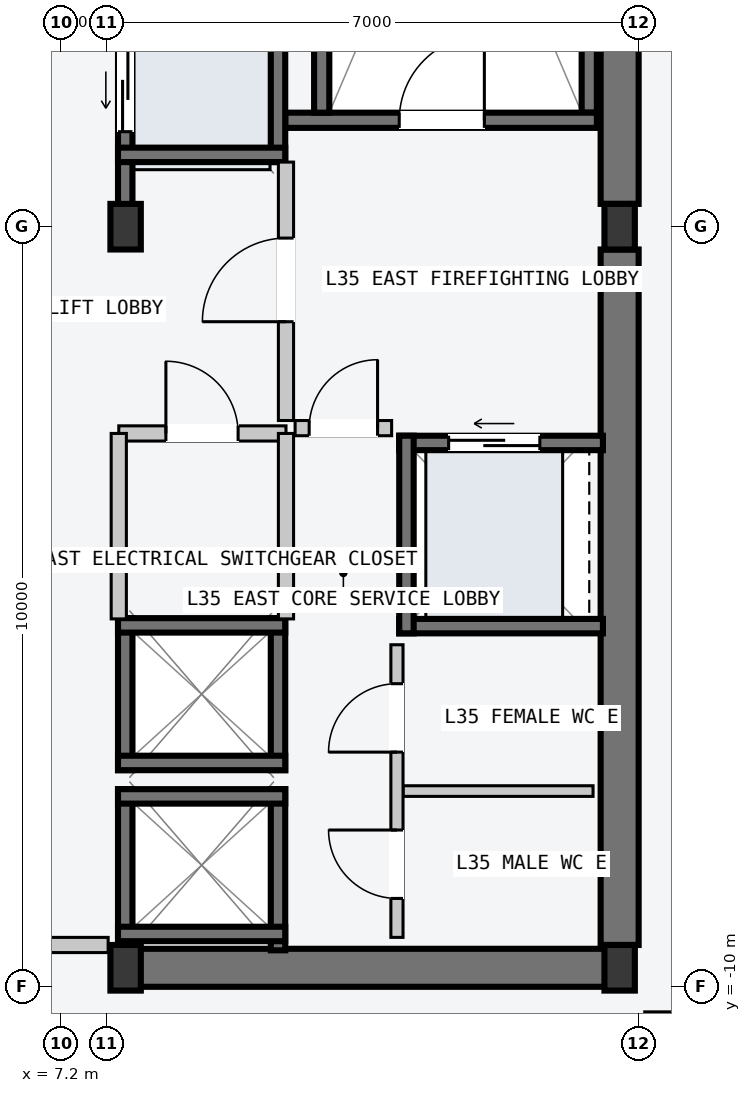
"""IFC4 building model, lengths in metres.
Left out: names, types, materials, properties, quantities, classifications, styles, units other than length and angle.
Written with IfcOpenShell. Run it as: python <this file> out.ifc"""

import sys

from ifc_helpers import new_model, si_unit, direction, frame, frame_2d, origin, origin_2d, place, context, subcontext, project, spatial, rectangle, i_section, extrude, element, fill, save


model = new_model("IFC4")
c1 = context("Model", 3, precision=1e-05, world=origin(), true_north=direction((0.0, 1.0)))
c2 = subcontext(c1, "Body", "Model", "MODEL_VIEW")
j1 = project(units=[si_unit("LENGTHUNIT", "METRE"), si_unit("PLANEANGLEUNIT", "RADIAN")], contexts=[c1])
p1 = place(None, origin())
s1 = spatial("IfcSite", under=j1, at=p1, CompositionType="ELEMENT")
p2 = place(p1, origin())
s2 = spatial("IfcBuilding", under=s1, at=p2, CompositionType="ELEMENT")
p3 = place(p2, frame((0.0, 0.0, 135.0)))
s3 = spatial("IfcBuildingStorey", under=s2, at=p3, CompositionType="ELEMENT", Elevation=135.0)
p4 = place(p3, frame((8.07, -9.75, -0.2), z_axis=(0.0, 0.0, 1.0), x_axis=(1.0, 0.0, 0.0)))
e1 = element("IfcWall", 1, at=p4, inside=s3, PredefinedType="SHEAR", context=c2, shape_type="SweptSolid", body=[
    extrude(rectangle(XDim=6.46, YDim=0.5, at=frame_2d((3.23, 0.0))), origin(), (0.0, 0.0, 1.0), 3.6),
])
for number, where, z_axis, x_axis in (
    (2, (14.55, -9.45, -0.2), (0.0, 0.0, 1.0), (0.0, 1.0, 0.0)),
    (3, (14.55, 0.3, -0.2), (0.0, 0.0, 1.0), (0.0, 1.0, 0.0)),
):
    element("IfcWall", number, at=place(p3, frame(where, z_axis=z_axis, x_axis=x_axis)), inside=s3, PredefinedType="SHEAR", context=c2, shape_type="SweptSolid", body=[
        extrude(rectangle(XDim=9.15, YDim=0.5, at=frame_2d((4.575, 0.0))), origin(), (0.0, 0.0, 1.0), 3.6),
    ])
p5 = place(p3, frame((14.15, 1.5, -0.2), z_axis=(0.0, 0.0, 1.0), x_axis=(0.0, 1.0, 0.0)))
e4 = element("IfcWall", 4, at=p5, inside=s3, PredefinedType="SOLIDWALL", context=c2, shape_type="SweptSolid", body=[
    extrude(rectangle(XDim=7.8, YDim=0.2, at=frame_2d((3.9, 0.0))), origin(), (0.0, 0.0, 1.0), 3.6),
])
p6 = place(p3, frame((10.15, 1.4, -0.2), z_axis=(0.0, 0.0, 1.0), x_axis=(1.0, 0.0, 0.0)))
e5 = element("IfcWall", 5, at=p6, inside=s3, PredefinedType="SOLIDWALL", context=c2, shape_type="SweptSolid", body=[
    extrude(rectangle(XDim=4.1, YDim=0.2, at=frame_2d((2.05, 0.0))), origin(), (0.0, 0.0, 1.0), 3.6),
])
p7 = place(p6, frame((1.5, 0.0, 0.2)))
e6 = element("IfcOpeningElement", 6, at=p7, cuts=e5, PredefinedType="OPENING", context=c2, shape_type="SweptSolid", body=[
    extrude(rectangle(XDim=1.12, YDim=2.18, at=frame_2d((0.56, 1.09))), frame((0.0, 0.11, 0.0), z_axis=(0.0, -1.0, 0.0), x_axis=(1.0, 0.0, 0.0)), (0.0, 0.0, 1.0), 0.22),
])
p8 = place(p3, frame((10.63, 1.5, -0.2), z_axis=(0.0, 0.0, 1.0), x_axis=(0.0, 1.0, 0.0)))
e7 = element("IfcWall", 7, at=p8, inside=s3, PredefinedType="SOLIDWALL", context=c2, shape_type="SweptSolid", body=[
    extrude(rectangle(XDim=7.8, YDim=0.2, at=frame_2d((3.9, 0.0))), origin(), (0.0, 0.0, 1.0), 3.6),
])
for number, where, z_axis, x_axis in (
    (8, (8.05, -9.75, 0.0), (0.0, 0.0, 1.0), (1.0, 0.0, 0.0)),
    (9, (8.05, 0.0, 0.0), (0.0, 0.0, 1.0), (1.0, 0.0, 0.0)),
    (10, (14.55, -9.75, 0.0), (0.0, 0.0, 1.0), (1.0, 0.0, 0.0)),
    (11, (14.55, 0.0, 0.0), (0.0, 0.0, 1.0), (1.0, 0.0, 0.0)),
):
    element("IfcColumn", number, at=place(p3, frame(where, z_axis=z_axis, x_axis=x_axis)), inside=s3, PredefinedType="COLUMN", context=c2, shape_type="SweptSolid", body=[
        extrude(i_section(OverallWidth=0.4, OverallDepth=0.6, WebThickness=0.022, FlangeThickness=0.036, at=origin_2d()), origin(), (0.0, 0.0, 1.0), 3.6),
    ])
p9 = place(p3, frame((8.045, 0.21, -0.2), z_axis=(0.0, 0.0, 1.0), x_axis=(0.0, 1.0, 0.0)))
e12 = element("IfcWall", 12, at=p9, inside=s3, PredefinedType="SOLIDWALL", context=c2, shape_type="SweptSolid", body=[
    extrude(rectangle(XDim=2.54, YDim=0.19, at=frame_2d((1.27, 0.0))), origin(), (0.0, 0.0, 1.0), 3.6),
])
p10 = place(p9, frame((1.04, 0.0, 0.2)))
e13 = element("IfcOpeningElement", 13, at=p10, cuts=e12, PredefinedType="OPENING", context=c2, shape_type="SweptSolid", body=[
    extrude(rectangle(XDim=1.1, YDim=2.2, at=frame_2d((0.55, 1.1))), frame((0.0, 0.105, 0.0), z_axis=(0.0, -1.0, 0.0), x_axis=(1.0, 0.0, 0.0)), (0.0, 0.0, 1.0), 0.21),
])
p11 = place(p3, frame((10.055, 0.85, -0.2), z_axis=(0.0, 0.0, 1.0), x_axis=(0.0, 1.0, 0.0)))
e14 = element("IfcWall", 14, at=p11, inside=s3, PredefinedType="SOLIDWALL", context=c2, shape_type="SweptSolid", body=[
    extrude(rectangle(XDim=1.9, YDim=0.19, at=frame_2d((0.95, 0.0))), origin(), (0.0, 0.0, 1.0), 3.6),
])
p12 = place(p3, frame((7.95, 0.945, -0.2), z_axis=(0.0, 0.0, 1.0), x_axis=(1.0, 0.0, 0.0)))
e15 = element("IfcWall", 15, at=p12, inside=s3, PredefinedType="SOLIDWALL", context=c2, shape_type="SweptSolid", body=[
    extrude(rectangle(XDim=2.2, YDim=0.19, at=frame_2d((1.1, 0.0))), origin(), (0.0, 0.0, 1.0), 3.6),
])
for number, where, z_axis, x_axis in (
    (16, (8.045, -9.52, -0.2), (0.0, 0.0, 1.0), (0.0, 1.0, 0.0)),
    (17, (10.055, -9.52, -0.2), (0.0, 0.0, 1.0), (0.0, 1.0, 0.0)),
):
    element("IfcWall", number, at=place(p3, frame(where, z_axis=z_axis, x_axis=x_axis)), inside=s3, PredefinedType="SOLIDWALL", context=c2, shape_type="SweptSolid", body=[
        extrude(rectangle(XDim=2.12, YDim=0.19, at=frame_2d((1.06, 0.0))), origin(), (0.0, 0.0, 1.0), 3.6),
    ])
for number, where, z_axis, x_axis in (
    (18, (7.95, -7.495, -0.2), (0.0, 0.0, 1.0), (1.0, 0.0, 0.0)),
    (19, (7.95, -9.305, -0.2), (0.0, 0.0, 1.0), (1.0, 0.0, 0.0)),
):
    element("IfcWall", number, at=place(p3, frame(where, z_axis=z_axis, x_axis=x_axis)), inside=s3, PredefinedType="SOLIDWALL", context=c2, shape_type="SweptSolid", body=[
        extrude(rectangle(XDim=2.2, YDim=0.19, at=frame_2d((1.1, 0.0))), origin(), (0.0, 0.0, 1.0), 3.6),
    ])
for number, where, z_axis, x_axis in (
    (20, (8.045, -7.15, -0.2), (0.0, 0.0, 1.0), (0.0, 1.0, 0.0)),
    (21, (10.055, -7.15, -0.2), (0.0, 0.0, 1.0), (0.0, 1.0, 0.0)),
):
    element("IfcWall", number, at=place(p3, frame(where, z_axis=z_axis, x_axis=x_axis)), inside=s3, PredefinedType="SOLIDWALL", context=c2, shape_type="SweptSolid", body=[
        extrude(rectangle(XDim=2.0, YDim=0.19, at=frame_2d((1.0, 0.0))), origin(), (0.0, 0.0, 1.0), 3.6),
    ])
for number, where, z_axis, x_axis in (
    (22, (7.95, -5.245, -0.2), (0.0, 0.0, 1.0), (1.0, 0.0, 0.0)),
    (23, (7.95, -7.055, -0.2), (0.0, 0.0, 1.0), (1.0, 0.0, 0.0)),
):
    element("IfcWall", number, at=place(p3, frame(where, z_axis=z_axis, x_axis=x_axis)), inside=s3, PredefinedType="SOLIDWALL", context=c2, shape_type="SweptSolid", body=[
        extrude(rectangle(XDim=2.2, YDim=0.19, at=frame_2d((1.1, 0.0))), origin(), (0.0, 0.0, 1.0), 3.6),
    ])
p13 = place(p3, frame((11.65, -2.845, -0.2), z_axis=(0.0, 0.0, 1.0), x_axis=(1.0, 0.0, 0.0)))
e24 = element("IfcWall", 24, at=p13, inside=s3, PredefinedType="SOLIDWALL", context=c2, shape_type="SweptSolid", body=[
    extrude(rectangle(XDim=2.68, YDim=0.19, at=frame_2d((1.34, 0.0))), origin(), (0.0, 0.0, 1.0), 3.6),
])
p14 = place(p13, frame((0.65, 0.0, 0.2)))
e25 = element("IfcOpeningElement", 25, at=p14, cuts=e24, PredefinedType="OPENING", context=c2, shape_type="SweptSolid", body=[
    extrude(rectangle(XDim=1.2, YDim=2.2, at=frame_2d((0.6, 1.1))), frame((0.0, 0.105, 0.0), z_axis=(0.0, -1.0, 0.0), x_axis=(1.0, 0.0, 0.0)), (0.0, 0.0, 1.0), 0.21),
])
p15 = place(p3, frame((11.65, -5.255, -0.2), z_axis=(0.0, 0.0, 1.0), x_axis=(1.0, 0.0, 0.0)))
e26 = element("IfcWall", 26, at=p15, inside=s3, PredefinedType="SOLIDWALL", context=c2, shape_type="SweptSolid", body=[
    extrude(rectangle(XDim=2.68, YDim=0.19, at=frame_2d((1.34, 0.0))), origin(), (0.0, 0.0, 1.0), 3.6),
])
p16 = place(p3, frame((11.745, -5.35, -0.2), z_axis=(0.0, 0.0, 1.0), x_axis=(0.0, 1.0, 0.0)))
e27 = element("IfcWall", 27, at=p16, inside=s3, PredefinedType="SOLIDWALL", context=c2, shape_type="SweptSolid", body=[
    extrude(rectangle(XDim=2.6, YDim=0.19, at=frame_2d((1.3, 0.0))), origin(), (0.0, 0.0, 1.0), 3.6),
])
p17 = place(p3, frame((6.02, -9.45, 0.0), z_axis=(0.0, 0.0, 1.0), x_axis=(1.0, 0.0, 0.0)))
e28 = element("IfcWall", 28, at=p17, inside=s3, PredefinedType="PARTITIONING", context=c2, shape_type="SweptSolid", body=[
    extrude(rectangle(XDim=1.8, YDim=0.2, at=frame_2d((0.9, 0.0))), origin(), (0.0, 0.0, 1.0), 3.4),
])
p18 = place(p3, frame((10.16, -2.55, 0.0), z_axis=(0.0, 0.0, 1.0), x_axis=(0.0, 1.0, 0.0)))
e29 = element("IfcWall", 29, at=p18, inside=s3, PredefinedType="PARTITIONING", context=c2, shape_type="SweptSolid", body=[
    extrude(rectangle(XDim=3.4, YDim=0.2, at=frame_2d((1.7, 0.0))), origin(), (0.0, 0.0, 1.0), 3.4),
])
p19 = place(p18, frame((1.3, 0.0, 0.0)))
e30 = element("IfcOpeningElement", 30, at=p19, cuts=e29, PredefinedType="OPENING", context=c2, shape_type="SweptSolid", body=[
    extrude(rectangle(XDim=1.1, YDim=2.15, at=frame_2d((0.55, 1.075))), frame((0.0, 0.11, 0.0), z_axis=(0.0, -1.0, 0.0), x_axis=(1.0, 0.0, 0.0)), (0.0, 0.0, 1.0), 0.22),
])
p20 = place(p3, frame((10.28, -2.65, 0.0), z_axis=(0.0, 0.0, 1.0), x_axis=(1.0, 0.0, 0.0)))
e31 = element("IfcWall", 31, at=p20, inside=s3, PredefinedType="PARTITIONING", context=c2, shape_type="SweptSolid", body=[
    extrude(rectangle(XDim=1.27, YDim=0.2, at=frame_2d((0.635, 0.0))), origin(), (0.0, 0.0, 1.0), 3.4),
])
p21 = place(p20, frame((0.185, 0.0, 0.0)))
e32 = element("IfcOpeningElement", 32, at=p21, cuts=e31, PredefinedType="OPENING", context=c2, shape_type="SweptSolid", body=[
    extrude(rectangle(XDim=0.9, YDim=2.15, at=frame_2d((0.45, 1.075))), frame((0.0, 0.11, 0.0), z_axis=(0.0, -1.0, 0.0), x_axis=(1.0, 0.0, 0.0)), (0.0, 0.0, 1.0), 0.22),
])
p22 = place(p3, frame((7.96, -2.72, 0.0), z_axis=(0.0, 0.0, 1.0), x_axis=(1.0, 0.0, 0.0)))
e33 = element("IfcWall", 33, at=p22, inside=s3, PredefinedType="PARTITIONING", context=c2, shape_type="SweptSolid", body=[
    extrude(rectangle(XDim=2.2, YDim=0.2, at=frame_2d((1.1, 0.0))), origin(), (0.0, 0.0, 1.0), 3.4),
])
p23 = place(p22, frame((0.62, 0.0, 0.0)))
e34 = element("IfcOpeningElement", 34, at=p23, cuts=e33, PredefinedType="OPENING", context=c2, shape_type="SweptSolid", body=[
    extrude(rectangle(XDim=0.95, YDim=2.1, at=frame_2d((0.475, 1.05))), frame((0.0, 0.11, 0.0), z_axis=(0.0, -1.0, 0.0), x_axis=(1.0, 0.0, 0.0)), (0.0, 0.0, 1.0), 0.22),
])
for number, where, z_axis, x_axis in (
    (35, (7.96, -5.16, 0.0), (0.0, 0.0, 1.0), (0.0, 1.0, 0.0)),
    (36, (10.16, -5.16, 0.0), (0.0, 0.0, 1.0), (0.0, 1.0, 0.0)),
):
    element("IfcWall", number, at=place(p3, frame(where, z_axis=z_axis, x_axis=x_axis)), inside=s3, PredefinedType="PARTITIONING", context=c2, shape_type="SweptSolid", body=[
        extrude(rectangle(XDim=2.44, YDim=0.2, at=frame_2d((1.22, 0.0))), origin(), (0.0, 0.0, 1.0), 3.4),
    ])
p24 = place(p3, frame((11.7, -7.425, 0.0), z_axis=(0.0, 0.0, 1.0), x_axis=(1.0, 0.0, 0.0)))
e37 = element("IfcWall", 37, at=p24, inside=s3, PredefinedType="PARTITIONING", context=c2, shape_type="SweptSolid", body=[
    extrude(rectangle(XDim=2.5, YDim=0.14, at=frame_2d((1.25, 0.0))), origin(), (0.0, 0.0, 1.0), 3.4),
])
p25 = place(p3, frame((11.62, -9.35, 0.0), z_axis=(0.0, 0.0, 1.0), x_axis=(0.0, 1.0, 0.0)))
e38 = element("IfcWall", 38, at=p25, inside=s3, PredefinedType="PARTITIONING", context=c2, shape_type="SweptSolid", body=[
    extrude(rectangle(XDim=3.85, YDim=0.16, at=frame_2d((1.925, 0.0))), origin(), (0.0, 0.0, 1.0), 3.4),
])
p26 = place(p25, frame((0.512, 0.0, 0.0)))
e39 = element("IfcOpeningElement", 39, at=p26, cuts=e38, PredefinedType="OPENING", context=c2, shape_type="SweptSolid", body=[
    extrude(rectangle(XDim=0.9, YDim=2.15, at=frame_2d((0.45, 1.075))), frame((0.0, 0.09, 0.0), z_axis=(0.0, -1.0, 0.0), x_axis=(1.0, 0.0, 0.0)), (0.0, 0.0, 1.0), 0.18),
])
p27 = place(p25, frame((2.438, 0.0, 0.0)))
e40 = element("IfcOpeningElement", 40, at=p27, cuts=e38, PredefinedType="OPENING", context=c2, shape_type="SweptSolid", body=[
    extrude(rectangle(XDim=0.9, YDim=2.15, at=frame_2d((0.45, 1.075))), frame((0.0, 0.09, 0.0), z_axis=(0.0, -1.0, 0.0), x_axis=(1.0, 0.0, 0.0)), (0.0, 0.0, 1.0), 0.18),
])
p28 = place(p3, frame((14.88, -10.4, 0.0), z_axis=(0.0, 0.0, 1.0), x_axis=(1.0, 0.0, 0.0)))
e41 = element("IfcWall", 41, at=p28, inside=s3, PredefinedType="PARTITIONING", context=c2, shape_type="SweptSolid", body=[
    extrude(rectangle(XDim=7.68, YDim=0.14, at=frame_2d((3.84, 0.0))), origin(), (0.0, 0.0, 1.0), 3.4),
])
p29 = place(p28, frame((3.36, 0.0, 0.0)))
e42 = element("IfcOpeningElement", 42, at=p29, cuts=e41, PredefinedType="OPENING", context=c2, shape_type="SweptSolid", body=[
    extrude(rectangle(XDim=0.96, YDim=2.18, at=frame_2d((0.48, 1.09))), frame((0.0, 0.08, 0.0), z_axis=(0.0, -1.0, 0.0), x_axis=(1.0, 0.0, 0.0)), (0.0, 0.0, 1.0), 0.16),
])
p30 = place(p7, origin())
e43 = element("IfcDoor", 43, at=p30, inside=s3, OperationType="SINGLE_SWING_RIGHT", PredefinedType="DOOR", context=c2, shape_type="SweptSolid", body=[
    extrude(rectangle(XDim=1.12, YDim=2.18, at=frame_2d((0.56, 1.09))), frame((0.0, 0.025, 0.0), z_axis=(0.0, -1.0, 0.0), x_axis=(1.0, 0.0, 0.0)), (0.0, 0.0, 1.0), 0.05),
])
fill(e6, e43)
p31 = place(p10, origin())
e44 = element("IfcDoor", 44, at=p31, inside=s3, OperationType="SLIDING_TO_LEFT", PredefinedType="DOOR", context=c2, shape_type="SweptSolid", body=[
    extrude(rectangle(XDim=1.1, YDim=2.2, at=frame_2d((0.55, 1.1))), frame((0.0, 0.025, 0.0), z_axis=(0.0, -1.0, 0.0), x_axis=(1.0, 0.0, 0.0)), (0.0, 0.0, 1.0), 0.05),
])
fill(e13, e44)
p32 = place(p14, origin())
e45 = element("IfcDoor", 45, at=p32, inside=s3, OperationType="SLIDING_TO_LEFT", PredefinedType="DOOR", context=c2, shape_type="SweptSolid", body=[
    extrude(rectangle(XDim=1.2, YDim=2.2, at=frame_2d((0.6, 1.1))), frame((0.0, 0.025, 0.0), z_axis=(0.0, -1.0, 0.0), x_axis=(1.0, 0.0, 0.0)), (0.0, 0.0, 1.0), 0.05),
])
fill(e25, e45)
p33 = place(p19, origin())
e46 = element("IfcDoor", 46, at=p33, inside=s3, OperationType="SINGLE_SWING_LEFT", PredefinedType="DOOR", context=c2, shape_type="SweptSolid", body=[
    extrude(rectangle(XDim=1.1, YDim=2.15, at=frame_2d((0.55, 1.075))), frame((0.0, 0.025, 0.0), z_axis=(0.0, -1.0, 0.0), x_axis=(1.0, 0.0, 0.0)), (0.0, 0.0, 1.0), 0.05),
])
fill(e30, e46)
p34 = place(p21, origin())
e47 = element("IfcDoor", 47, at=p34, inside=s3, OperationType="SINGLE_SWING_RIGHT", PredefinedType="DOOR", context=c2, shape_type="SweptSolid", body=[
    extrude(rectangle(XDim=0.9, YDim=2.15, at=frame_2d((0.45, 1.075))), frame((0.0, 0.025, 0.0), z_axis=(0.0, -1.0, 0.0), x_axis=(1.0, 0.0, 0.0)), (0.0, 0.0, 1.0), 0.05),
])
fill(e32, e47)
p35 = place(p23, origin())
e48 = element("IfcDoor", 48, at=p35, inside=s3, OperationType="SINGLE_SWING_LEFT", PredefinedType="DOOR", context=c2, shape_type="SweptSolid", body=[
    extrude(rectangle(XDim=0.95, YDim=2.1, at=frame_2d((0.475, 1.05))), frame((0.0, 0.025, 0.0), z_axis=(0.0, -1.0, 0.0), x_axis=(1.0, 0.0, 0.0)), (0.0, 0.0, 1.0), 0.05),
])
fill(e34, e48)
p36 = place(p26, origin())
e49 = element("IfcDoor", 49, at=p36, inside=s3, OperationType="SINGLE_SWING_RIGHT", PredefinedType="DOOR", context=c2, shape_type="SweptSolid", body=[
    extrude(rectangle(XDim=0.9, YDim=2.15, at=frame_2d((0.45, 1.075))), frame((0.0, 0.025, 0.0), z_axis=(0.0, -1.0, 0.0), x_axis=(1.0, 0.0, 0.0)), (0.0, 0.0, 1.0), 0.05),
])
fill(e39, e49)
p37 = place(p27, origin())
e50 = element("IfcDoor", 50, at=p37, inside=s3, OperationType="SINGLE_SWING_LEFT", PredefinedType="DOOR", context=c2, shape_type="SweptSolid", body=[
    extrude(rectangle(XDim=0.9, YDim=2.15, at=frame_2d((0.45, 1.075))), frame((0.0, 0.025, 0.0), z_axis=(0.0, -1.0, 0.0), x_axis=(1.0, 0.0, 0.0)), (0.0, 0.0, 1.0), 0.05),
])
fill(e40, e50)
save(model, sys.argv[1])
